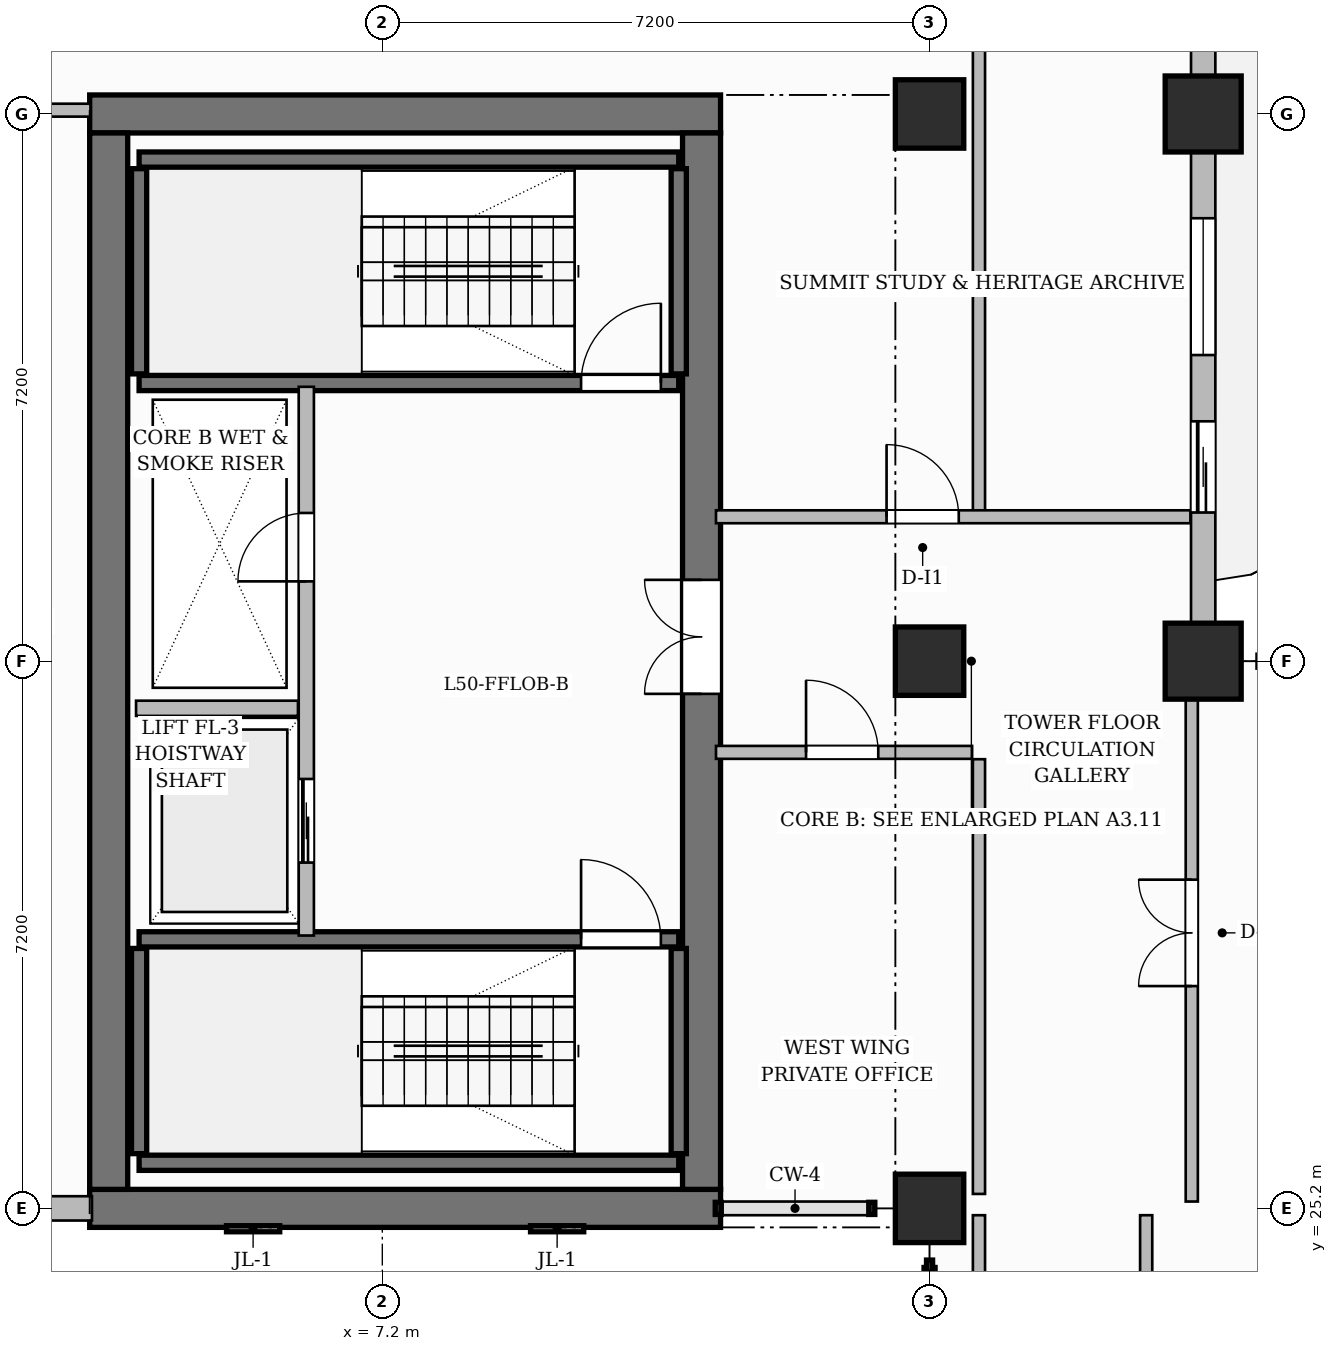
"""IFC4 building model, lengths in metres.
Left out: names, types, materials, properties, quantities, classifications, styles, units other than length and angle.
Written with IfcOpenShell. Run it as: python <this file> out.ifc"""

import sys

from ifc_helpers import new_model, si_unit, direction, frame, frame_2d, origin, origin_2d, place, context, subcontext, project, spatial, rectangle, extrude, source, transform, mapped, element, fill, save


model = new_model("IFC4")
c1 = context("Model", 3, precision=1e-05, world=origin(), true_north=direction((0.0, 1.0)))
c2 = subcontext(c1, "Body", "Model", "MODEL_VIEW")
j1 = project(units=[si_unit("LENGTHUNIT", "METRE"), si_unit("PLANEANGLEUNIT", "RADIAN")], contexts=[c1])
p1 = place(None, origin())
s1 = spatial("IfcSite", under=j1, at=p1, CompositionType="ELEMENT")
p2 = place(p1, origin())
s2 = spatial("IfcBuilding", under=s1, at=p2, CompositionType="ELEMENT")
p3 = place(p2, frame((0.0, 0.0, 201.9)))
s3 = spatial("IfcBuildingStorey", under=s2, at=p3, CompositionType="ELEMENT", Elevation=201.9)
for number, where, z_axis, x_axis in (
    (1, (3.35, 25.2, 0.0), (0.0, 0.0, 1.0), (1.0, 0.0, 0.0)),
    (2, (3.35, 39.6, 0.0), (0.0, 0.0, 1.0), (1.0, 0.0, 0.0)),
):
    element("IfcWall", number, at=place(p3, frame(where, z_axis=z_axis, x_axis=x_axis)), inside=s3, PredefinedType="SHEAR", context=c2, shape_type="SweptSolid", body=[
        extrude(rectangle(XDim=8.3, YDim=0.5, at=frame_2d((4.15, 0.0))), origin(), (0.0, 0.0, 1.0), 3.85),
    ])
p4 = place(p3, frame((3.6, 25.45, 0.0), z_axis=(0.0, 0.0, 1.0), x_axis=(0.0, 1.0, 0.0)))
e3 = element("IfcWall", 3, at=p4, inside=s3, PredefinedType="SHEAR", context=c2, shape_type="SweptSolid", body=[
    extrude(rectangle(XDim=13.9, YDim=0.5, at=frame_2d((6.95, 0.0))), origin(), (0.0, 0.0, 1.0), 3.85),
])
p5 = place(p3, frame((11.4, 25.45, 0.0), z_axis=(0.0, 0.0, 1.0), x_axis=(0.0, 1.0, 0.0)))
e4 = element("IfcWall", 4, at=p5, inside=s3, PredefinedType="SHEAR", context=c2, shape_type="SweptSolid", body=[
    extrude(rectangle(XDim=13.9, YDim=0.5, at=frame_2d((6.95, 0.0))), origin(), (0.0, 0.0, 1.0), 3.85),
])
p6 = place(p5, frame((6.52, 0.0, 0.0)))
e5 = element("IfcOpeningElement", 5, at=p6, cuts=e4, PredefinedType="OPENING", context=c2, shape_type="SweptSolid", body=[
    extrude(rectangle(XDim=1.5, YDim=2.2, at=frame_2d((0.75, 1.1))), frame((0.0, 0.26, 0.0), z_axis=(0.0, -1.0, 0.0), x_axis=(1.0, 0.0, 0.0)), (0.0, 0.0, 1.0), 0.52),
])
m1 = source(origin(), c2, "Body", "SweptSolid", [
    extrude(rectangle(XDim=0.9, YDim=0.9, at=origin_2d()), origin(), (0.0, 0.0, 1.0), 3.85),
])
for number, where, z_axis, x_axis in (
    (6, (14.4, 25.2, 0.0), (0.0, 0.0, 1.0), (1.0, 0.0, 0.0)),
    (7, (14.4, 32.4, 0.0), (0.0, 0.0, 1.0), (1.0, 0.0, 0.0)),
    (8, (14.4, 39.6, 0.0), (0.0, 0.0, 1.0), (1.0, 0.0, 0.0)),
):
    element("IfcColumn", number, at=place(p3, frame(where, z_axis=z_axis, x_axis=x_axis)), inside=s3, PredefinedType="COLUMN", context=c2, shape_type="MappedRepresentation", body=[
        mapped(m1, transform((0.0, 0.0, 0.0), scale=1.0)),
    ])
m2 = source(origin(), c2, "Body", "SweptSolid", [
    extrude(rectangle(XDim=1.0, YDim=1.0, at=origin_2d()), origin(), (0.0, 0.0, 1.0), 3.85),
])
for number, where, z_axis, x_axis in (
    (9, (18.0, 32.4, 0.0), (0.0, 0.0, 1.0), (1.0, 0.0, 0.0)),
    (10, (18.0, 39.6, 0.0), (0.0, 0.0, 1.0), (1.0, 0.0, 0.0)),
):
    element("IfcColumn", number, at=place(p3, frame(where, z_axis=z_axis, x_axis=x_axis)), inside=s3, PredefinedType="COLUMN", context=c2, shape_type="MappedRepresentation", body=[
        mapped(m2, transform((0.0, 0.0, 0.0), scale=1.0)),
    ])
p7 = place(p3, frame((4.0, 25.8, 0.0), z_axis=(0.0, 0.0, 1.0), x_axis=(1.0, 0.0, 0.0)))
e11 = element("IfcWall", 11, at=p7, inside=s3, PredefinedType="SHEAR", context=c2, shape_type="SweptSolid", body=[
    extrude(rectangle(XDim=7.1, YDim=0.2, at=frame_2d((3.55, 0.0))), origin(), (0.0, 0.0, 1.0), 3.85),
])
for number, where, z_axis, x_axis in (
    (12, (4.0, 25.92, 0.0), (0.0, 0.0, 1.0), (0.0, 1.0, 0.0)),
    (13, (11.1, 25.92, 0.0), (0.0, 0.0, 1.0), (0.0, 1.0, 0.0)),
):
    element("IfcWall", number, at=place(p3, frame(where, z_axis=z_axis, x_axis=x_axis)), inside=s3, PredefinedType="SHEAR", context=c2, shape_type="SweptSolid", body=[
        extrude(rectangle(XDim=2.7, YDim=0.2, at=frame_2d((1.35, 0.0))), origin(), (0.0, 0.0, 1.0), 3.85),
    ])
p8 = place(p3, frame((4.0, 28.74, 0.0), z_axis=(0.0, 0.0, 1.0), x_axis=(1.0, 0.0, 0.0)))
e14 = element("IfcWall", 14, at=p8, inside=s3, PredefinedType="SHEAR", context=c2, shape_type="SweptSolid", body=[
    extrude(rectangle(XDim=7.1, YDim=0.2, at=frame_2d((3.55, 0.0))), origin(), (0.0, 0.0, 1.0), 3.85),
])
p9 = place(p8, frame((5.815, 0.0, 0.0)))
e15 = element("IfcOpeningElement", 15, at=p9, cuts=e14, PredefinedType="OPENING", context=c2, shape_type="SweptSolid", body=[
    extrude(rectangle(XDim=1.05, YDim=2.2, at=frame_2d((0.525, 1.1))), frame((0.0, 0.11, 0.0), z_axis=(0.0, -1.0, 0.0), x_axis=(1.0, 0.0, 0.0)), (0.0, 0.0, 1.0), 0.22),
])
p10 = place(p3, frame((4.0, 39.0, 0.0), z_axis=(0.0, 0.0, 1.0), x_axis=(1.0, 0.0, 0.0)))
e16 = element("IfcWall", 16, at=p10, inside=s3, PredefinedType="SHEAR", context=c2, shape_type="SweptSolid", body=[
    extrude(rectangle(XDim=7.1, YDim=0.2, at=frame_2d((3.55, 0.0))), origin(), (0.0, 0.0, 1.0), 3.85),
])
for number, where, z_axis, x_axis in (
    (17, (4.0, 36.18, 0.0), (0.0, 0.0, 1.0), (0.0, 1.0, 0.0)),
    (18, (11.1, 36.18, 0.0), (0.0, 0.0, 1.0), (0.0, 1.0, 0.0)),
):
    element("IfcWall", number, at=place(p3, frame(where, z_axis=z_axis, x_axis=x_axis)), inside=s3, PredefinedType="SHEAR", context=c2, shape_type="SweptSolid", body=[
        extrude(rectangle(XDim=2.7, YDim=0.2, at=frame_2d((1.35, 0.0))), origin(), (0.0, 0.0, 1.0), 3.85),
    ])
p11 = place(p3, frame((4.0, 36.06, 0.0), z_axis=(0.0, 0.0, 1.0), x_axis=(1.0, 0.0, 0.0)))
e19 = element("IfcWall", 19, at=p11, inside=s3, PredefinedType="SHEAR", context=c2, shape_type="SweptSolid", body=[
    extrude(rectangle(XDim=7.1, YDim=0.2, at=frame_2d((3.55, 0.0))), origin(), (0.0, 0.0, 1.0), 3.85),
])
p12 = place(p11, frame((5.815, 0.0, 0.0)))
e20 = element("IfcOpeningElement", 20, at=p12, cuts=e19, PredefinedType="OPENING", context=c2, shape_type="SweptSolid", body=[
    extrude(rectangle(XDim=1.05, YDim=2.2, at=frame_2d((0.525, 1.1))), frame((0.0, 0.11, 0.0), z_axis=(0.0, -1.0, 0.0), x_axis=(1.0, 0.0, 0.0)), (0.0, 0.0, 1.0), 0.22),
])
p13 = place(p3, frame((6.2, 28.79, 0.0), z_axis=(0.0, 0.0, 1.0), x_axis=(0.0, 1.0, 0.0)))
e21 = element("IfcWall", 21, at=p13, inside=s3, PredefinedType="PARTITIONING", context=c2, shape_type="SweptSolid", body=[
    extrude(rectangle(XDim=7.22, YDim=0.2, at=frame_2d((3.61, 0.0))), origin(), (0.0, 0.0, 1.0), 3.6),
])
p14 = place(p13, frame((4.66, 0.0, 0.0)))
e22 = element("IfcOpeningElement", 22, at=p14, cuts=e21, PredefinedType="OPENING", context=c2, shape_type="SweptSolid", body=[
    extrude(rectangle(XDim=0.9, YDim=2.1, at=frame_2d((0.45, 1.05))), frame((0.0, 0.11, 0.0), z_axis=(0.0, -1.0, 0.0), x_axis=(1.0, 0.0, 0.0)), (0.0, 0.0, 1.0), 0.22),
])
p15 = place(p13, frame((0.96, 0.0, 0.0)))
e23 = element("IfcOpeningElement", 23, at=p15, cuts=e21, PredefinedType="OPENING", context=c2, shape_type="SweptSolid", body=[
    extrude(rectangle(XDim=1.1, YDim=2.2, at=frame_2d((0.55, 1.1))), frame((0.0, 0.11, 0.0), z_axis=(0.0, -1.0, 0.0), x_axis=(1.0, 0.0, 0.0)), (0.0, 0.0, 1.0), 0.22),
])
p16 = place(p3, frame((3.96, 31.78, 0.0), z_axis=(0.0, 0.0, 1.0), x_axis=(1.0, 0.0, 0.0)))
e24 = element("IfcWall", 24, at=p16, inside=s3, PredefinedType="PARTITIONING", context=c2, shape_type="SweptSolid", body=[
    extrude(rectangle(XDim=2.13, YDim=0.2, at=frame_2d((1.065, 0.0))), origin(), (0.0, 0.0, 1.0), 3.6),
])
for number, where, z_axis, x_axis in (
    (25, (15.05, 11.36, 0.0), (0.0, 0.0, 1.0), (0.0, 1.0, 0.0)),
    (26, (17.25, 11.36, 0.0), (0.0, 0.0, 1.0), (0.0, 1.0, 0.0)),
):
    element("IfcWall", number, at=place(p3, frame(where, z_axis=z_axis, x_axis=x_axis)), inside=s3, PredefinedType="PARTITIONING", context=c2, shape_type="SweptSolid", body=[
        extrude(rectangle(XDim=13.75, YDim=0.16, at=frame_2d((6.875, 0.0))), origin(), (0.0, 0.0, 1.0), 3.6),
    ])
p17 = place(p3, frame((0.24, 39.65, 0.0), z_axis=(0.0, 0.0, 1.0), x_axis=(1.0, 0.0, 0.0)))
e27 = element("IfcWall", 27, at=p17, inside=s3, PredefinedType="PARTITIONING", context=c2, shape_type="SweptSolid", body=[
    extrude(rectangle(XDim=3.12, YDim=0.17, at=frame_2d((1.56, 0.0))), origin(), (0.0, 0.0, 1.0), 3.6),
])
p18 = place(p17, frame((1.11, 0.0, 0.0)))
e28 = element("IfcOpeningElement", 28, at=p18, cuts=e27, PredefinedType="OPENING", context=c2, shape_type="SweptSolid", body=[
    extrude(rectangle(XDim=0.9, YDim=2.15, at=frame_2d((0.45, 1.075))), frame((0.0, 0.095, 0.0), z_axis=(0.0, -1.0, 0.0), x_axis=(1.0, 0.0, 0.0)), (0.0, 0.0, 1.0), 0.19),
])
p19 = place(p3, frame((15.05, 34.34, 0.0), z_axis=(0.0, 0.0, 1.0), x_axis=(0.0, 1.0, 0.0)))
e29 = element("IfcWall", 29, at=p19, inside=s3, PredefinedType="PARTITIONING", context=c2, shape_type="SweptSolid", body=[
    extrude(rectangle(XDim=12.292, YDim=0.16, at=frame_2d((6.146, 0.0))), origin(), (0.0, 0.0, 1.0), 3.6),
])
p20 = place(p19, frame((8.01, 0.0, 0.0)))
e30 = element("IfcOpeningElement", 30, at=p20, cuts=e29, PredefinedType="OPENING", context=c2, shape_type="SweptSolid", body=[
    extrude(rectangle(XDim=1.6, YDim=2.4, at=frame_2d((0.8, 1.2))), frame((0.0, 0.09, 0.0), z_axis=(0.0, -1.0, 0.0), x_axis=(1.0, 0.0, 0.0)), (0.0, 0.0, 1.0), 0.18),
])
p21 = place(p3, frame((15.05, 25.39, 0.0), z_axis=(0.0, 0.0, 1.0), x_axis=(0.0, 1.0, 0.0)))
e31 = element("IfcWall", 31, at=p21, inside=s3, PredefinedType="PARTITIONING", context=c2, shape_type="SweptSolid", body=[
    extrude(rectangle(XDim=5.72, YDim=0.16, at=frame_2d((2.86, 0.0))), origin(), (0.0, 0.0, 1.0), 3.6),
])
p22 = place(p3, frame((11.59, 31.2, 0.0), z_axis=(0.0, 0.0, 1.0), x_axis=(1.0, 0.0, 0.0)))
e32 = element("IfcWall", 32, at=p22, inside=s3, PredefinedType="PARTITIONING", context=c2, shape_type="SweptSolid", body=[
    extrude(rectangle(XDim=3.37, YDim=0.17, at=frame_2d((1.685, 0.0))), origin(), (0.0, 0.0, 1.0), 3.6),
])
p23 = place(p22, frame((1.185, 0.0, 0.0)))
e33 = element("IfcOpeningElement", 33, at=p23, cuts=e32, PredefinedType="OPENING", context=c2, shape_type="SweptSolid", body=[
    extrude(rectangle(XDim=0.95, YDim=2.15, at=frame_2d((0.475, 1.075))), frame((0.0, 0.095, 0.0), z_axis=(0.0, -1.0, 0.0), x_axis=(1.0, 0.0, 0.0)), (0.0, 0.0, 1.0), 0.19),
])
p24 = place(p3, frame((11.59, 34.3, 0.0), z_axis=(0.0, 0.0, 1.0), x_axis=(1.0, 0.0, 0.0)))
e34 = element("IfcWall", 34, at=p24, inside=s3, PredefinedType="PARTITIONING", context=c2, shape_type="SweptSolid", body=[
    extrude(rectangle(XDim=6.242, YDim=0.17, at=frame_2d((3.121, 0.0))), origin(), (0.0, 0.0, 1.0), 3.6),
])
p25 = place(p24, frame((2.244, 0.0, 0.0)))
e35 = element("IfcOpeningElement", 35, at=p25, cuts=e34, PredefinedType="OPENING", context=c2, shape_type="SweptSolid", body=[
    extrude(rectangle(XDim=0.95, YDim=2.15, at=frame_2d((0.475, 1.075))), frame((0.0, 0.095, 0.0), z_axis=(0.0, -1.0, 0.0), x_axis=(1.0, 0.0, 0.0)), (0.0, 0.0, 1.0), 0.19),
])
p26 = place(p3, frame((17.85, 25.29, 0.0), z_axis=(0.0, 0.0, 1.0), x_axis=(0.0, 1.0, 0.0)))
e36 = element("IfcWall", 36, at=p26, inside=s3, PredefinedType="PARTITIONING", context=c2, shape_type="SweptSolid", body=[
    extrude(rectangle(XDim=6.92, YDim=0.16, at=frame_2d((3.46, 0.0))), origin(), (0.0, 0.0, 1.0), 3.6),
])
p27 = place(p26, frame((2.835, 0.0, 0.0)))
e37 = element("IfcOpeningElement", 37, at=p27, cuts=e36, PredefinedType="OPENING", context=c2, shape_type="SweptSolid", body=[
    extrude(rectangle(XDim=1.4, YDim=2.35, at=frame_2d((0.7, 1.175))), frame((0.0, 0.09, 0.0), z_axis=(0.0, -1.0, 0.0), x_axis=(1.0, 0.0, 0.0)), (0.0, 0.0, 1.0), 0.18),
])
p28 = place(p3, frame((0.0, 25.2, 0.0), z_axis=(0.0, 0.0, 1.0), x_axis=(1.0, 0.0, 0.0)))
e38 = element("IfcWall", 38, at=p28, inside=s3, PredefinedType="SOLIDWALL", context=c2, shape_type="SweptSolid", body=[
    extrude(rectangle(XDim=3.38, YDim=0.32, at=frame_2d((1.69, 0.0))), origin(), (0.0, 0.0, 1.0), 3.6),
])
p29 = place(p28, frame((1.205, 0.0, 0.8)))
e39 = element("IfcOpeningElement", 39, at=p29, cuts=e38, PredefinedType="OPENING", context=c2, shape_type="SweptSolid", body=[
    extrude(rectangle(XDim=1.4, YDim=1.85, at=frame_2d((0.7, 0.925))), frame((0.0, 0.17, 0.0), z_axis=(0.0, -1.0, 0.0), x_axis=(1.0, 0.0, 0.0)), (0.0, 0.0, 1.0), 0.34),
])
p30 = place(p3, frame((18.0, 32.4, 0.0), z_axis=(0.0, 0.0, 1.0), x_axis=(0.0, 1.0, 0.0)))
e40 = element("IfcWall", 40, at=p30, inside=s3, PredefinedType="SOLIDWALL", context=c2, shape_type="SweptSolid", body=[
    extrude(rectangle(XDim=14.35, YDim=0.32, at=frame_2d((7.175, 0.0))), origin(), (0.0, 0.0, 1.0), 3.6),
])
p31 = place(p30, frame((1.956, 0.0, 0.0)))
e41 = element("IfcOpeningElement", 41, at=p31, cuts=e40, PredefinedType="OPENING", context=c2, shape_type="SweptSolid", body=[
    extrude(rectangle(XDim=1.2, YDim=2.2, at=frame_2d((0.6, 1.1))), frame((0.0, 0.17, 0.0), z_axis=(0.0, -1.0, 0.0), x_axis=(1.0, 0.0, 0.0)), (0.0, 0.0, 1.0), 0.34),
])
p32 = place(p30, frame((4.028, 0.0, 0.8)))
e42 = element("IfcOpeningElement", 42, at=p32, cuts=e40, PredefinedType="OPENING", context=c2, shape_type="SweptSolid", body=[
    extrude(rectangle(XDim=1.8, YDim=1.85, at=frame_2d((0.9, 0.925))), frame((0.0, 0.17, 0.0), z_axis=(0.0, -1.0, 0.0), x_axis=(1.0, 0.0, 0.0)), (0.0, 0.0, 1.0), 0.34),
])
p33 = place(p30, frame((8.525, 0.0, 0.8)))
e43 = element("IfcOpeningElement", 43, at=p33, cuts=e40, PredefinedType="OPENING", context=c2, shape_type="SweptSolid", body=[
    extrude(rectangle(XDim=1.8, YDim=1.85, at=frame_2d((0.9, 0.925))), frame((0.0, 0.17, 0.0), z_axis=(0.0, -1.0, 0.0), x_axis=(1.0, 0.0, 0.0)), (0.0, 0.0, 1.0), 0.34),
])
p34 = place(p30, frame((11.275, 0.0, 0.8)))
e44 = element("IfcOpeningElement", 44, at=p34, cuts=e40, PredefinedType="OPENING", context=c2, shape_type="SweptSolid", body=[
    extrude(rectangle(XDim=1.8, YDim=1.85, at=frame_2d((0.9, 0.925))), frame((0.0, 0.17, 0.0), z_axis=(0.0, -1.0, 0.0), x_axis=(1.0, 0.0, 0.0)), (0.0, 0.0, 1.0), 0.34),
])
m3 = source(origin(), c2, "Body", "SweptSolid", [
    extrude(rectangle(XDim=1.05, YDim=2.2, at=frame_2d((0.525, 1.1))), frame((0.0, 0.025, 0.0), z_axis=(0.0, -1.0, 0.0), x_axis=(1.0, 0.0, 0.0)), (0.0, 0.0, 1.0), 0.05),
])
p35 = place(p9, origin())
e45 = element("IfcDoor", 45, at=p35, inside=s3, OperationType="SINGLE_SWING_LEFT", PredefinedType="DOOR", context=c2, shape_type="MappedRepresentation", body=[
    mapped(m3, transform((0.0, 0.0, 0.0), scale=1.0)),
])
fill(e15, e45)
p36 = place(p12, origin())
e46 = element("IfcDoor", 46, at=p36, inside=s3, OperationType="SINGLE_SWING_RIGHT", PredefinedType="DOOR", context=c2, shape_type="MappedRepresentation", body=[
    mapped(m3, transform((0.0, 0.0, 0.0), scale=1.0)),
])
fill(e20, e46)
m4 = source(origin(), c2, "Body", "SweptSolid", [
    extrude(rectangle(XDim=0.9, YDim=2.1, at=frame_2d((0.45, 1.05))), frame((0.0, 0.025, 0.0), z_axis=(0.0, -1.0, 0.0), x_axis=(1.0, 0.0, 0.0)), (0.0, 0.0, 1.0), 0.05),
])
p37 = place(p14, origin())
e47 = element("IfcDoor", 47, at=p37, inside=s3, OperationType="SINGLE_SWING_LEFT", PredefinedType="DOOR", context=c2, shape_type="MappedRepresentation", body=[
    mapped(m4, transform((0.0, 0.0, 0.0), scale=1.0)),
])
fill(e22, e47)
m5 = source(origin(), c2, "Body", "SweptSolid", [
    extrude(rectangle(XDim=1.5, YDim=2.2, at=frame_2d((0.75, 1.1))), frame((0.0, 0.025, 0.0), z_axis=(0.0, -1.0, 0.0), x_axis=(1.0, 0.0, 0.0)), (0.0, 0.0, 1.0), 0.05),
])
p38 = place(p6, origin())
e48 = element("IfcDoor", 48, at=p38, inside=s3, OperationType="DOUBLE_DOOR_SINGLE_SWING", PredefinedType="DOOR", context=c2, shape_type="MappedRepresentation", body=[
    mapped(m5, transform((0.0, 0.0, 0.0), scale=1.0)),
])
fill(e5, e48)
m6 = source(origin(), c2, "Body", "SweptSolid", [
    extrude(rectangle(XDim=0.95, YDim=2.15, at=frame_2d((0.475, 1.075))), frame((0.0, 0.025, 0.0), z_axis=(0.0, -1.0, 0.0), x_axis=(1.0, 0.0, 0.0)), (0.0, 0.0, 1.0), 0.05),
])
p39 = place(p23, origin())
e49 = element("IfcDoor", 49, at=p39, inside=s3, OperationType="SINGLE_SWING_LEFT", PredefinedType="DOOR", context=c2, shape_type="MappedRepresentation", body=[
    mapped(m6, transform((0.0, 0.0, 0.0), scale=1.0)),
])
fill(e33, e49)
p40 = place(p25, origin())
e50 = element("IfcDoor", 50, at=p40, inside=s3, OperationType="SINGLE_SWING_LEFT", PredefinedType="DOOR", context=c2, shape_type="MappedRepresentation", body=[
    mapped(m6, transform((0.0, 0.0, 0.0), scale=1.0)),
])
fill(e35, e50)
m7 = source(origin(), c2, "Body", "SweptSolid", [
    extrude(rectangle(XDim=1.4, YDim=2.35, at=frame_2d((0.7, 1.175))), frame((0.0, 0.025, 0.0), z_axis=(0.0, -1.0, 0.0), x_axis=(1.0, 0.0, 0.0)), (0.0, 0.0, 1.0), 0.05),
])
p41 = place(p27, origin())
e51 = element("IfcDoor", 51, at=p41, inside=s3, OperationType="DOUBLE_DOOR_SINGLE_SWING", PredefinedType="DOOR", context=c2, shape_type="MappedRepresentation", body=[
    mapped(m7, transform((0.0, 0.0, 0.0), scale=1.0)),
])
fill(e37, e51)
m8 = source(origin(), c2, "Body", "SweptSolid", [
    extrude(rectangle(XDim=1.1, YDim=2.2, at=frame_2d((0.55, 1.1))), frame((0.0, 0.025, 0.0), z_axis=(0.0, -1.0, 0.0), x_axis=(1.0, 0.0, 0.0)), (0.0, 0.0, 1.0), 0.05),
])
p42 = place(p15, origin())
e52 = element("IfcDoor", 52, at=p42, inside=s3, OperationType="SLIDING_TO_LEFT", PredefinedType="DOOR", context=c2, shape_type="MappedRepresentation", body=[
    mapped(m8, transform((0.0, 0.0, 0.0), scale=1.0)),
])
fill(e23, e52)
m9 = source(origin(), c2, "Body", "SweptSolid", [
    extrude(rectangle(XDim=1.2, YDim=2.2, at=frame_2d((0.6, 1.1))), frame((0.0, 0.025, 0.0), z_axis=(0.0, -1.0, 0.0), x_axis=(1.0, 0.0, 0.0)), (0.0, 0.0, 1.0), 0.05),
])
p43 = place(p31, origin())
e53 = element("IfcDoor", 53, at=p43, inside=s3, OperationType="SLIDING_TO_LEFT", PredefinedType="DOOR", context=c2, shape_type="MappedRepresentation", body=[
    mapped(m9, transform((0.0, 0.0, 0.0), scale=1.0)),
])
fill(e41, e53)
m10 = source(origin(), c2, "Body", "SweptSolid", [
    extrude(rectangle(XDim=1.8, YDim=1.85, at=frame_2d((0.9, 0.925))), frame((0.0, 0.03, 0.0), z_axis=(0.0, -1.0, 0.0), x_axis=(1.0, 0.0, 0.0)), (0.0, 0.0, 1.0), 0.06),
])
p44 = place(p32, origin())
e54 = element("IfcWindow", 54, at=p44, inside=s3, PartitioningType="DOUBLE_PANEL_VERTICAL", PredefinedType="WINDOW", context=c2, shape_type="MappedRepresentation", body=[
    mapped(m10, transform((0.0, 0.0, 0.0), scale=1.0)),
])
fill(e42, e54)
save(model, sys.argv[1])
